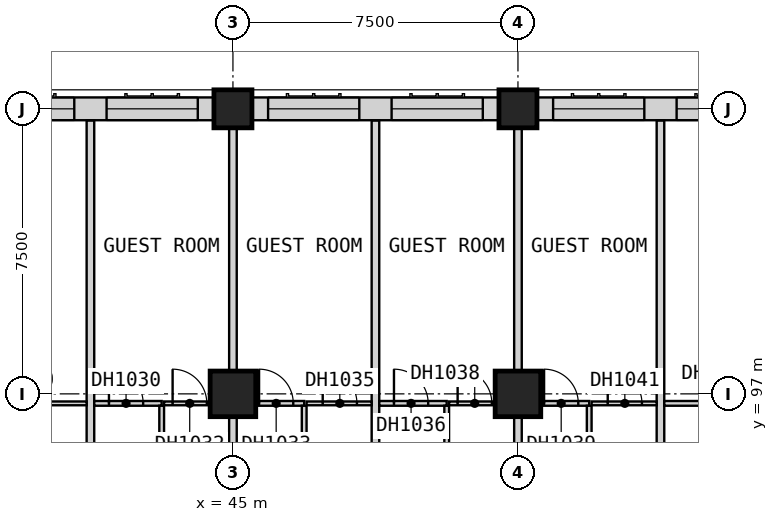
"""IFC4 building model, lengths in metres.
Left out: names, types, materials, properties, quantities, classifications, styles, units other than length and angle.
Written with IfcOpenShell. Run it as: python <this file> out.ifc"""

import sys

from ifc_helpers import new_model, si_unit, direction, frame, frame_2d, origin, origin_2d, place, context, subcontext, project, spatial, rectangle, extrude, element, fill, save


model = new_model("IFC4")
c1 = context("Model", 3, precision=1e-05, world=origin(), true_north=direction((0.0, 1.0)))
c2 = subcontext(c1, "Body", "Model", "MODEL_VIEW")
j1 = project(units=[si_unit("LENGTHUNIT", "METRE"), si_unit("PLANEANGLEUNIT", "RADIAN")], contexts=[c1])
p1 = place(None, origin())
s1 = spatial("IfcSite", under=j1, at=p1, CompositionType="ELEMENT")
p2 = place(p1, origin())
s2 = spatial("IfcBuilding", under=s1, at=p2, CompositionType="ELEMENT")
p3 = place(p2, frame((0.0, 0.0, 48.4)))
s3 = spatial("IfcBuildingStorey", under=s2, at=p3, CompositionType="ELEMENT", Elevation=48.4)
p4 = place(p3, frame((45.0, 97.0, 0.0), z_axis=(0.0, 0.0, 1.0), x_axis=(1.0, 0.0, 0.0)))
e1 = element("IfcColumn", 1, at=p4, inside=s3, PredefinedType="COLUMN", context=c2, shape_type="SweptSolid", body=[
    extrude(rectangle(XDim=1.2, YDim=1.2, at=origin_2d()), origin(), (0.0, 0.0, 1.0), 3.6),
])
p5 = place(p3, frame((45.0, 104.5, 0.0), z_axis=(0.0, 0.0, 1.0), x_axis=(1.0, 0.0, 0.0)))
e2 = element("IfcColumn", 2, at=p5, inside=s3, PredefinedType="COLUMN", context=c2, shape_type="SweptSolid", body=[
    extrude(rectangle(XDim=1.0, YDim=1.0, at=origin_2d()), origin(), (0.0, 0.0, 1.0), 3.6),
])
p6 = place(p3, frame((52.5, 97.0, 0.0), z_axis=(0.0, 0.0, 1.0), x_axis=(1.0, 0.0, 0.0)))
e3 = element("IfcColumn", 3, at=p6, inside=s3, PredefinedType="COLUMN", context=c2, shape_type="SweptSolid", body=[
    extrude(rectangle(XDim=1.2, YDim=1.2, at=origin_2d()), origin(), (0.0, 0.0, 1.0), 3.6),
])
p7 = place(p3, frame((52.5, 104.5, 0.0), z_axis=(0.0, 0.0, 1.0), x_axis=(1.0, 0.0, 0.0)))
e4 = element("IfcColumn", 4, at=p7, inside=s3, PredefinedType="COLUMN", context=c2, shape_type="SweptSolid", body=[
    extrude(rectangle(XDim=1.0, YDim=1.0, at=origin_2d()), origin(), (0.0, 0.0, 1.0), 3.6),
])
p8 = place(p3, frame((59.5, 104.5, 0.0), z_axis=(0.0, 0.0, 1.0), x_axis=(-1.0, 0.0, 0.0)))
e5 = element("IfcWall", 5, at=p8, inside=s3, PredefinedType="SOLIDWALL", context=c2, shape_type="SweptSolid", body=[
    extrude(rectangle(XDim=6.5, YDim=0.6, at=frame_2d((3.25, 0.0))), origin(), (0.0, 0.0, 1.0), 2.85),
])
p9 = place(p8, frame((3.675, 0.0, 0.8)))
e6 = element("IfcOpeningElement", 6, at=p9, cuts=e5, PredefinedType="OPENING", context=c2, shape_type="SweptSolid", body=[
    extrude(rectangle(XDim=2.4, YDim=1.8, at=frame_2d((1.2, 0.9))), frame((0.0, 0.31, 0.0), z_axis=(0.0, -1.0, 0.0), x_axis=(1.0, 0.0, 0.0)), (0.0, 0.0, 1.0), 0.62),
])
p10 = place(p8, frame((0.425, 0.0, 0.8)))
e7 = element("IfcOpeningElement", 7, at=p10, cuts=e5, PredefinedType="OPENING", context=c2, shape_type="SweptSolid", body=[
    extrude(rectangle(XDim=2.4, YDim=1.8, at=frame_2d((1.2, 0.9))), frame((0.0, 0.31, 0.0), z_axis=(0.0, -1.0, 0.0), x_axis=(1.0, 0.0, 0.0)), (0.0, 0.0, 1.0), 0.62),
])
p11 = place(p3, frame((52.0, 104.5, 0.0), z_axis=(0.0, 0.0, 1.0), x_axis=(-1.0, 0.0, 0.0)))
e8 = element("IfcWall", 8, at=p11, inside=s3, PredefinedType="SOLIDWALL", context=c2, shape_type="SweptSolid", body=[
    extrude(rectangle(XDim=6.5, YDim=0.6, at=frame_2d((3.25, 0.0))), origin(), (0.0, 0.0, 1.0), 2.85),
])
p12 = place(p11, frame((3.675, 0.0, 0.8)))
e9 = element("IfcOpeningElement", 9, at=p12, cuts=e8, PredefinedType="OPENING", context=c2, shape_type="SweptSolid", body=[
    extrude(rectangle(XDim=2.4, YDim=1.8, at=frame_2d((1.2, 0.9))), frame((0.0, 0.31, 0.0), z_axis=(0.0, -1.0, 0.0), x_axis=(1.0, 0.0, 0.0)), (0.0, 0.0, 1.0), 0.62),
])
p13 = place(p11, frame((0.425, 0.0, 0.8)))
e10 = element("IfcOpeningElement", 10, at=p13, cuts=e8, PredefinedType="OPENING", context=c2, shape_type="SweptSolid", body=[
    extrude(rectangle(XDim=2.4, YDim=1.8, at=frame_2d((1.2, 0.9))), frame((0.0, 0.31, 0.0), z_axis=(0.0, -1.0, 0.0), x_axis=(1.0, 0.0, 0.0)), (0.0, 0.0, 1.0), 0.62),
])
p14 = place(p3, frame((44.5, 104.5, 0.0), z_axis=(0.0, 0.0, 1.0), x_axis=(-1.0, 0.0, 0.0)))
e11 = element("IfcWall", 11, at=p14, inside=s3, PredefinedType="SOLIDWALL", context=c2, shape_type="SweptSolid", body=[
    extrude(rectangle(XDim=6.5, YDim=0.6, at=frame_2d((3.25, 0.0))), origin(), (0.0, 0.0, 1.0), 2.85),
])
p15 = place(p14, frame((3.675, 0.0, 0.8)))
e12 = element("IfcOpeningElement", 12, at=p15, cuts=e11, PredefinedType="OPENING", context=c2, shape_type="SweptSolid", body=[
    extrude(rectangle(XDim=2.4, YDim=1.8, at=frame_2d((1.2, 0.9))), frame((0.0, 0.31, 0.0), z_axis=(0.0, -1.0, 0.0), x_axis=(1.0, 0.0, 0.0)), (0.0, 0.0, 1.0), 0.62),
])
p16 = place(p14, frame((0.425, 0.0, 0.8)))
e13 = element("IfcOpeningElement", 13, at=p16, cuts=e11, PredefinedType="OPENING", context=c2, shape_type="SweptSolid", body=[
    extrude(rectangle(XDim=2.4, YDim=1.8, at=frame_2d((1.2, 0.9))), frame((0.0, 0.31, 0.0), z_axis=(0.0, -1.0, 0.0), x_axis=(1.0, 0.0, 0.0)), (0.0, 0.0, 1.0), 0.62),
])
p17 = place(p3, frame((41.25, 92.475, 0.0), z_axis=(0.0, 0.0, 1.0), x_axis=(0.0, 1.0, 0.0)))
e14 = element("IfcWall", 14, at=p17, inside=s3, PredefinedType="PARTITIONING", context=c2, shape_type="SweptSolid", body=[
    extrude(rectangle(XDim=11.715, YDim=0.2, at=frame_2d((5.857, 0.0))), origin(), (0.0, 0.0, 1.0), 3.35),
])
p18 = place(p3, frame((45.0, 92.475, 0.0), z_axis=(0.0, 0.0, 1.0), x_axis=(0.0, 1.0, 0.0)))
e15 = element("IfcWall", 15, at=p18, inside=s3, PredefinedType="PARTITIONING", context=c2, shape_type="SweptSolid", body=[
    extrude(rectangle(XDim=12.525, YDim=0.2, at=frame_2d((6.262, 0.0))), origin(), (0.0, 0.0, 1.0), 3.35),
])
p19 = place(p3, frame((48.75, 92.475, 0.0), z_axis=(0.0, 0.0, 1.0), x_axis=(0.0, 1.0, 0.0)))
e16 = element("IfcWall", 16, at=p19, inside=s3, PredefinedType="PARTITIONING", context=c2, shape_type="SweptSolid", body=[
    extrude(rectangle(XDim=11.715, YDim=0.2, at=frame_2d((5.857, 0.0))), origin(), (0.0, 0.0, 1.0), 3.35),
])
p20 = place(p3, frame((52.5, 92.475, 0.0), z_axis=(0.0, 0.0, 1.0), x_axis=(0.0, 1.0, 0.0)))
e17 = element("IfcWall", 17, at=p20, inside=s3, PredefinedType="PARTITIONING", context=c2, shape_type="SweptSolid", body=[
    extrude(rectangle(XDim=12.525, YDim=0.2, at=frame_2d((6.262, 0.0))), origin(), (0.0, 0.0, 1.0), 3.35),
])
p21 = place(p3, frame((56.25, 92.475, 0.0), z_axis=(0.0, 0.0, 1.0), x_axis=(0.0, 1.0, 0.0)))
e18 = element("IfcWall", 18, at=p21, inside=s3, PredefinedType="PARTITIONING", context=c2, shape_type="SweptSolid", body=[
    extrude(rectangle(XDim=11.715, YDim=0.2, at=frame_2d((5.857, 0.0))), origin(), (0.0, 0.0, 1.0), 3.35),
])
p22 = place(p3, frame((33.812, 96.75, 0.0), z_axis=(0.0, 0.0, 1.0), x_axis=(1.0, 0.0, 0.0)))
e19 = element("IfcWall", 19, at=p22, inside=s3, PredefinedType="PARTITIONING", context=c2, shape_type="SweptSolid", body=[
    extrude(rectangle(XDim=7.337, YDim=0.1, at=frame_2d((3.669, 0.0))), origin(), (0.0, 0.0, 1.0), 3.35),
])
p23 = place(p22, frame((5.113, 0.0, 0.0)))
e20 = element("IfcOpeningElement", 20, at=p23, cuts=e19, PredefinedType="OPENING", context=c2, shape_type="SweptSolid", body=[
    extrude(rectangle(XDim=0.9, YDim=2.1, at=frame_2d((0.45, 1.05))), frame((0.0, 0.06, 0.0), z_axis=(0.0, -1.0, 0.0), x_axis=(1.0, 0.0, 0.0)), (0.0, 0.0, 1.0), 0.12),
])
p24 = place(p3, frame((43.188, 96.75, 0.0), z_axis=(0.0, 0.0, 1.0), x_axis=(1.0, 0.0, 0.0)))
e21 = element("IfcWall", 21, at=p24, inside=s3, PredefinedType="PARTITIONING", context=c2, shape_type="SweptSolid", body=[
    extrude(rectangle(XDim=1.712, YDim=0.1, at=frame_2d((0.856, 0.0))), origin(), (0.0, 0.0, 1.0), 3.35),
])
p25 = place(p24, frame((0.225, 0.0, 0.0)))
e22 = element("IfcOpeningElement", 22, at=p25, cuts=e21, PredefinedType="OPENING", context=c2, shape_type="SweptSolid", body=[
    extrude(rectangle(XDim=0.9, YDim=2.1, at=frame_2d((0.45, 1.05))), frame((0.0, 0.06, 0.0), z_axis=(0.0, -1.0, 0.0), x_axis=(1.0, 0.0, 0.0)), (0.0, 0.0, 1.0), 0.12),
])
p26 = place(p3, frame((46.938, 96.75, 0.0), z_axis=(0.0, 0.0, 1.0), x_axis=(1.0, 0.0, 0.0)))
e23 = element("IfcWall", 23, at=p26, inside=s3, PredefinedType="PARTITIONING", context=c2, shape_type="SweptSolid", body=[
    extrude(rectangle(XDim=1.712, YDim=0.1, at=frame_2d((0.856, 0.0))), origin(), (0.0, 0.0, 1.0), 3.35),
])
p27 = place(p26, frame((0.425, 0.0, 0.0)))
e24 = element("IfcOpeningElement", 24, at=p27, cuts=e23, PredefinedType="OPENING", context=c2, shape_type="SweptSolid", body=[
    extrude(rectangle(XDim=0.9, YDim=2.1, at=frame_2d((0.45, 1.05))), frame((0.0, 0.06, 0.0), z_axis=(0.0, -1.0, 0.0), x_axis=(1.0, 0.0, 0.0)), (0.0, 0.0, 1.0), 0.12),
])
p28 = place(p3, frame((50.688, 96.75, 0.0), z_axis=(0.0, 0.0, 1.0), x_axis=(1.0, 0.0, 0.0)))
e25 = element("IfcWall", 25, at=p28, inside=s3, PredefinedType="PARTITIONING", context=c2, shape_type="SweptSolid", body=[
    extrude(rectangle(XDim=1.712, YDim=0.1, at=frame_2d((0.856, 0.0))), origin(), (0.0, 0.0, 1.0), 3.35),
])
p29 = place(p28, frame((0.225, 0.0, 0.0)))
e26 = element("IfcOpeningElement", 26, at=p29, cuts=e25, PredefinedType="OPENING", context=c2, shape_type="SweptSolid", body=[
    extrude(rectangle(XDim=0.9, YDim=2.1, at=frame_2d((0.45, 1.05))), frame((0.0, 0.06, 0.0), z_axis=(0.0, -1.0, 0.0), x_axis=(1.0, 0.0, 0.0)), (0.0, 0.0, 1.0), 0.12),
])
p30 = place(p3, frame((54.438, 96.75, 0.0), z_axis=(0.0, 0.0, 1.0), x_axis=(1.0, 0.0, 0.0)))
e27 = element("IfcWall", 27, at=p30, inside=s3, PredefinedType="PARTITIONING", context=c2, shape_type="SweptSolid", body=[
    extrude(rectangle(XDim=1.712, YDim=0.1, at=frame_2d((0.856, 0.0))), origin(), (0.0, 0.0, 1.0), 3.35),
])
p31 = place(p30, frame((0.425, 0.0, 0.0)))
e28 = element("IfcOpeningElement", 28, at=p31, cuts=e27, PredefinedType="OPENING", context=c2, shape_type="SweptSolid", body=[
    extrude(rectangle(XDim=0.9, YDim=2.1, at=frame_2d((0.45, 1.05))), frame((0.0, 0.06, 0.0), z_axis=(0.0, -1.0, 0.0), x_axis=(1.0, 0.0, 0.0)), (0.0, 0.0, 1.0), 0.12),
])
p32 = place(p3, frame((41.35, 96.75, 0.0), z_axis=(0.0, 0.0, 1.0), x_axis=(1.0, 0.0, 0.0)))
e29 = element("IfcWall", 29, at=p32, inside=s3, PredefinedType="PARTITIONING", context=c2, shape_type="SweptSolid", body=[
    extrude(rectangle(XDim=1.775, YDim=0.125, at=frame_2d((0.887, 0.0))), origin(), (0.0, 0.0, 1.0), 3.35),
])
p33 = place(p32, frame((0.387, 0.0, 0.0)))
e30 = element("IfcOpeningElement", 30, at=p33, cuts=e29, PredefinedType="OPENING", context=c2, shape_type="SweptSolid", body=[
    extrude(rectangle(XDim=0.9, YDim=2.1, at=frame_2d((0.45, 1.05))), frame((0.0, 0.073, 0.0), z_axis=(0.0, -1.0, 0.0), x_axis=(1.0, 0.0, 0.0)), (0.0, 0.0, 1.0), 0.145),
])
p34 = place(p3, frame((45.1, 96.75, 0.0), z_axis=(0.0, 0.0, 1.0), x_axis=(1.0, 0.0, 0.0)))
e31 = element("IfcWall", 31, at=p34, inside=s3, PredefinedType="PARTITIONING", context=c2, shape_type="SweptSolid", body=[
    extrude(rectangle(XDim=1.775, YDim=0.125, at=frame_2d((0.887, 0.0))), origin(), (0.0, 0.0, 1.0), 3.35),
])
p35 = place(p34, frame((0.587, 0.0, 0.0)))
e32 = element("IfcOpeningElement", 32, at=p35, cuts=e31, PredefinedType="OPENING", context=c2, shape_type="SweptSolid", body=[
    extrude(rectangle(XDim=0.9, YDim=2.1, at=frame_2d((0.45, 1.05))), frame((0.0, 0.073, 0.0), z_axis=(0.0, -1.0, 0.0), x_axis=(1.0, 0.0, 0.0)), (0.0, 0.0, 1.0), 0.145),
])
p36 = place(p3, frame((48.85, 96.75, 0.0), z_axis=(0.0, 0.0, 1.0), x_axis=(1.0, 0.0, 0.0)))
e33 = element("IfcWall", 33, at=p36, inside=s3, PredefinedType="PARTITIONING", context=c2, shape_type="SweptSolid", body=[
    extrude(rectangle(XDim=1.775, YDim=0.125, at=frame_2d((0.887, 0.0))), origin(), (0.0, 0.0, 1.0), 3.35),
])
p37 = place(p36, frame((0.387, 0.0, 0.0)))
e34 = element("IfcOpeningElement", 34, at=p37, cuts=e33, PredefinedType="OPENING", context=c2, shape_type="SweptSolid", body=[
    extrude(rectangle(XDim=0.9, YDim=2.1, at=frame_2d((0.45, 1.05))), frame((0.0, 0.073, 0.0), z_axis=(0.0, -1.0, 0.0), x_axis=(1.0, 0.0, 0.0)), (0.0, 0.0, 1.0), 0.145),
])
p38 = place(p3, frame((52.6, 96.75, 0.0), z_axis=(0.0, 0.0, 1.0), x_axis=(1.0, 0.0, 0.0)))
e35 = element("IfcWall", 35, at=p38, inside=s3, PredefinedType="PARTITIONING", context=c2, shape_type="SweptSolid", body=[
    extrude(rectangle(XDim=1.775, YDim=0.125, at=frame_2d((0.887, 0.0))), origin(), (0.0, 0.0, 1.0), 3.35),
])
p39 = place(p38, frame((0.587, 0.0, 0.0)))
e36 = element("IfcOpeningElement", 36, at=p39, cuts=e35, PredefinedType="OPENING", context=c2, shape_type="SweptSolid", body=[
    extrude(rectangle(XDim=0.9, YDim=2.1, at=frame_2d((0.45, 1.05))), frame((0.0, 0.073, 0.0), z_axis=(0.0, -1.0, 0.0), x_axis=(1.0, 0.0, 0.0)), (0.0, 0.0, 1.0), 0.145),
])
p40 = place(p3, frame((56.35, 96.75, 0.0), z_axis=(0.0, 0.0, 1.0), x_axis=(1.0, 0.0, 0.0)))
e37 = element("IfcWall", 37, at=p40, inside=s3, PredefinedType="PARTITIONING", context=c2, shape_type="SweptSolid", body=[
    extrude(rectangle(XDim=4.4, YDim=0.125, at=frame_2d((2.2, 0.0))), origin(), (0.0, 0.0, 1.0), 3.35),
])
p41 = place(p40, frame((1.7, 0.0, 0.0)))
e38 = element("IfcOpeningElement", 38, at=p41, cuts=e37, PredefinedType="OPENING", context=c2, shape_type="SweptSolid", body=[
    extrude(rectangle(XDim=0.9, YDim=2.1, at=frame_2d((0.45, 1.05))), frame((0.0, 0.073, 0.0), z_axis=(0.0, -1.0, 0.0), x_axis=(1.0, 0.0, 0.0)), (0.0, 0.0, 1.0), 0.145),
])
for number, where, z_axis, x_axis in (
    (39, (43.125, 92.475, 0.0), (0.0, 0.0, 1.0), (0.0, 1.0, 0.0)),
    (40, (46.875, 92.475, 0.0), (0.0, 0.0, 1.0), (0.0, 1.0, 0.0)),
    (41, (50.625, 92.475, 0.0), (0.0, 0.0, 1.0), (0.0, 1.0, 0.0)),
    (42, (54.375, 92.475, 0.0), (0.0, 0.0, 1.0), (0.0, 1.0, 0.0)),
):
    element("IfcWall", number, at=place(p3, frame(where, z_axis=z_axis, x_axis=x_axis)), inside=s3, PredefinedType="PARTITIONING", context=c2, shape_type="SweptSolid", body=[
        extrude(rectangle(XDim=4.212, YDim=0.125, at=frame_2d((2.106, 0.0))), origin(), (0.0, 0.0, 1.0), 3.35),
    ])
p42 = place(p9, origin())
e43 = element("IfcWindow", 43, at=p42, inside=s3, PartitioningType="SINGLE_PANEL", PredefinedType="WINDOW", context=c2, shape_type="SweptSolid", body=[
    extrude(rectangle(XDim=2.4, YDim=1.8, at=frame_2d((1.2, 0.9))), frame((0.0, -0.07, 0.0), z_axis=(0.0, -1.0, 0.0), x_axis=(1.0, 0.0, 0.0)), (0.0, 0.0, 1.0), 0.06),
])
fill(e6, e43)
p43 = place(p10, origin())
e44 = element("IfcWindow", 44, at=p43, inside=s3, PartitioningType="SINGLE_PANEL", PredefinedType="WINDOW", context=c2, shape_type="SweptSolid", body=[
    extrude(rectangle(XDim=2.4, YDim=1.8, at=frame_2d((1.2, 0.9))), frame((0.0, -0.07, 0.0), z_axis=(0.0, -1.0, 0.0), x_axis=(1.0, 0.0, 0.0)), (0.0, 0.0, 1.0), 0.06),
])
fill(e7, e44)
p44 = place(p12, origin())
e45 = element("IfcWindow", 45, at=p44, inside=s3, PartitioningType="SINGLE_PANEL", PredefinedType="WINDOW", context=c2, shape_type="SweptSolid", body=[
    extrude(rectangle(XDim=2.4, YDim=1.8, at=frame_2d((1.2, 0.9))), frame((0.0, -0.07, 0.0), z_axis=(0.0, -1.0, 0.0), x_axis=(1.0, 0.0, 0.0)), (0.0, 0.0, 1.0), 0.06),
])
fill(e9, e45)
p45 = place(p13, origin())
e46 = element("IfcWindow", 46, at=p45, inside=s3, PartitioningType="SINGLE_PANEL", PredefinedType="WINDOW", context=c2, shape_type="SweptSolid", body=[
    extrude(rectangle(XDim=2.4, YDim=1.8, at=frame_2d((1.2, 0.9))), frame((0.0, -0.07, 0.0), z_axis=(0.0, -1.0, 0.0), x_axis=(1.0, 0.0, 0.0)), (0.0, 0.0, 1.0), 0.06),
])
fill(e10, e46)
p46 = place(p15, origin())
e47 = element("IfcWindow", 47, at=p46, inside=s3, PartitioningType="SINGLE_PANEL", PredefinedType="WINDOW", context=c2, shape_type="SweptSolid", body=[
    extrude(rectangle(XDim=2.4, YDim=1.8, at=frame_2d((1.2, 0.9))), frame((0.0, -0.07, 0.0), z_axis=(0.0, -1.0, 0.0), x_axis=(1.0, 0.0, 0.0)), (0.0, 0.0, 1.0), 0.06),
])
fill(e12, e47)
p47 = place(p16, origin())
e48 = element("IfcWindow", 48, at=p47, inside=s3, PartitioningType="SINGLE_PANEL", PredefinedType="WINDOW", context=c2, shape_type="SweptSolid", body=[
    extrude(rectangle(XDim=2.4, YDim=1.8, at=frame_2d((1.2, 0.9))), frame((0.0, -0.07, 0.0), z_axis=(0.0, -1.0, 0.0), x_axis=(1.0, 0.0, 0.0)), (0.0, 0.0, 1.0), 0.06),
])
fill(e13, e48)
p48 = place(p33, origin())
e49 = element("IfcDoor", 49, at=p48, inside=s3, OperationType="SINGLE_SWING_RIGHT", PredefinedType="DOOR", context=c2, shape_type="SweptSolid", body=[
    extrude(rectangle(XDim=0.9, YDim=2.1, at=frame_2d((0.45, 1.05))), frame((0.0, 0.025, 0.0), z_axis=(0.0, -1.0, 0.0), x_axis=(1.0, 0.0, 0.0)), (0.0, 0.0, 1.0), 0.05),
])
fill(e30, e49)
p49 = place(p25, origin())
e50 = element("IfcDoor", 50, at=p49, inside=s3, OperationType="SINGLE_SWING_RIGHT", PredefinedType="DOOR", context=c2, shape_type="SweptSolid", body=[
    extrude(rectangle(XDim=0.9, YDim=2.1, at=frame_2d((0.45, 1.05))), frame((0.0, 0.025, 0.0), z_axis=(0.0, -1.0, 0.0), x_axis=(1.0, 0.0, 0.0)), (0.0, 0.0, 1.0), 0.05),
])
fill(e22, e50)
p50 = place(p35, origin())
e51 = element("IfcDoor", 51, at=p50, inside=s3, OperationType="SINGLE_SWING_LEFT", PredefinedType="DOOR", context=c2, shape_type="SweptSolid", body=[
    extrude(rectangle(XDim=0.9, YDim=2.1, at=frame_2d((0.45, 1.05))), frame((0.0, 0.025, 0.0), z_axis=(0.0, -1.0, 0.0), x_axis=(1.0, 0.0, 0.0)), (0.0, 0.0, 1.0), 0.05),
])
fill(e32, e51)
p51 = place(p27, origin())
e52 = element("IfcDoor", 52, at=p51, inside=s3, OperationType="SINGLE_SWING_RIGHT", PredefinedType="DOOR", context=c2, shape_type="SweptSolid", body=[
    extrude(rectangle(XDim=0.9, YDim=2.1, at=frame_2d((0.45, 1.05))), frame((0.0, 0.025, 0.0), z_axis=(0.0, -1.0, 0.0), x_axis=(1.0, 0.0, 0.0)), (0.0, 0.0, 1.0), 0.05),
])
fill(e24, e52)
p52 = place(p37, origin())
e53 = element("IfcDoor", 53, at=p52, inside=s3, OperationType="SINGLE_SWING_RIGHT", PredefinedType="DOOR", context=c2, shape_type="SweptSolid", body=[
    extrude(rectangle(XDim=0.9, YDim=2.1, at=frame_2d((0.45, 1.05))), frame((0.0, 0.025, 0.0), z_axis=(0.0, -1.0, 0.0), x_axis=(1.0, 0.0, 0.0)), (0.0, 0.0, 1.0), 0.05),
])
fill(e34, e53)
p53 = place(p29, origin())
e54 = element("IfcDoor", 54, at=p53, inside=s3, OperationType="SINGLE_SWING_RIGHT", PredefinedType="DOOR", context=c2, shape_type="SweptSolid", body=[
    extrude(rectangle(XDim=0.9, YDim=2.1, at=frame_2d((0.45, 1.05))), frame((0.0, 0.025, 0.0), z_axis=(0.0, -1.0, 0.0), x_axis=(1.0, 0.0, 0.0)), (0.0, 0.0, 1.0), 0.05),
])
fill(e26, e54)
p54 = place(p39, origin())
e55 = element("IfcDoor", 55, at=p54, inside=s3, OperationType="SINGLE_SWING_LEFT", PredefinedType="DOOR", context=c2, shape_type="SweptSolid", body=[
    extrude(rectangle(XDim=0.9, YDim=2.1, at=frame_2d((0.45, 1.05))), frame((0.0, 0.025, 0.0), z_axis=(0.0, -1.0, 0.0), x_axis=(1.0, 0.0, 0.0)), (0.0, 0.0, 1.0), 0.05),
])
fill(e36, e55)
p55 = place(p31, origin())
e56 = element("IfcDoor", 56, at=p55, inside=s3, OperationType="SINGLE_SWING_RIGHT", PredefinedType="DOOR", context=c2, shape_type="SweptSolid", body=[
    extrude(rectangle(XDim=0.9, YDim=2.1, at=frame_2d((0.45, 1.05))), frame((0.0, 0.025, 0.0), z_axis=(0.0, -1.0, 0.0), x_axis=(1.0, 0.0, 0.0)), (0.0, 0.0, 1.0), 0.05),
])
fill(e28, e56)
save(model, sys.argv[1])
